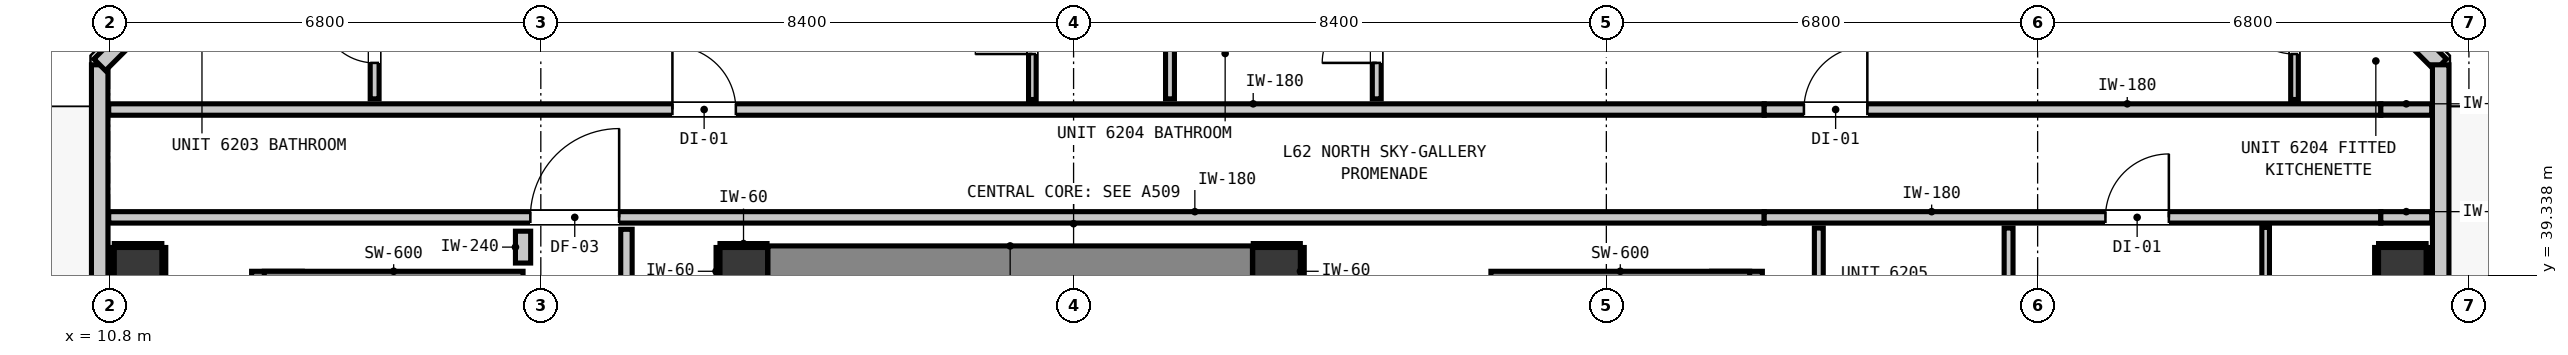
"""IFC4 building model, lengths in metres.
Left out: names, types, materials, properties, quantities, classifications, styles, units other than length and angle.
Written with IfcOpenShell. Run it as: python <this file> out.ifc"""

import sys

from ifc_helpers import new_model, si_unit, direction, frame, frame_2d, origin, origin_2d, place, context, subcontext, project, spatial, rectangle, extrude, element, fill, save


model = new_model("IFC4")
c1 = context("Model", 3, precision=1e-05, world=origin(), true_north=direction((0.0, 1.0)))
c2 = subcontext(c1, "Body", "Model", "MODEL_VIEW")
j1 = project(units=[si_unit("LENGTHUNIT", "METRE"), si_unit("PLANEANGLEUNIT", "RADIAN")], contexts=[c1])
p1 = place(None, origin())
s1 = spatial("IfcSite", under=j1, at=p1, CompositionType="ELEMENT")
p2 = place(p1, origin())
s2 = spatial("IfcBuilding", under=s1, at=p2, CompositionType="ELEMENT")
p3 = place(p2, frame((0.0, 0.0, 213.4)))
s3 = spatial("IfcBuildingStorey", under=s2, at=p3, CompositionType="ELEMENT", Elevation=213.4)
for number, where, z_axis, x_axis in (
    (1, (20.8, 39.4, 0.0), (0.0, 0.0, 1.0), (1.0, 0.0, 0.0)),
    (2, (29.2, 39.4, 0.0), (0.0, 0.0, 1.0), (1.0, 0.0, 0.0)),
):
    element("IfcColumn", number, at=place(p3, frame(where, z_axis=z_axis, x_axis=x_axis)), inside=s3, PredefinedType="COLUMN", context=c2, shape_type="SweptSolid", body=[
        extrude(rectangle(XDim=0.75, YDim=0.75, at=origin_2d()), origin(), (0.0, 0.0, 1.0), 3.32),
    ])
p4 = place(p3, frame((13.44, 31.08, 0.0), z_axis=(0.0, 0.0, 1.0), x_axis=(0.0, 1.0, 0.0)))
e3 = element("IfcWall", 3, at=p4, inside=s3, PredefinedType="SHEAR", context=c2, shape_type="SweptSolid", body=[
    extrude(rectangle(XDim=8.32, YDim=0.8, at=frame_2d((4.16, 0.0))), origin(), (0.0, 0.0, 1.0), 3.32),
])
p5 = place(p3, frame((13.24, 39.1, 0.0), z_axis=(0.0, 0.0, 1.0), x_axis=(1.0, 0.0, 0.0)))
e4 = element("IfcWall", 4, at=p5, inside=s3, PredefinedType="SHEAR", context=c2, shape_type="SweptSolid", body=[
    extrude(rectangle(XDim=4.08, YDim=0.6, at=frame_2d((2.04, 0.0))), origin(), (0.0, 0.0, 1.0), 3.32),
])
p6 = place(p3, frame((36.46, 31.08, 0.0), z_axis=(0.0, 0.0, 1.0), x_axis=(0.0, 1.0, 0.0)))
e5 = element("IfcWall", 5, at=p6, inside=s3, PredefinedType="SHEAR", context=c2, shape_type="SweptSolid", body=[
    extrude(rectangle(XDim=8.32, YDim=0.8, at=frame_2d((4.16, 0.0))), origin(), (0.0, 0.0, 1.0), 3.32),
])
p7 = place(p3, frame((32.58, 39.1, 0.0), z_axis=(0.0, 0.0, 1.0), x_axis=(1.0, 0.0, 0.0)))
e6 = element("IfcWall", 6, at=p7, inside=s3, PredefinedType="SHEAR", context=c2, shape_type="SweptSolid", body=[
    extrude(rectangle(XDim=4.08, YDim=0.6, at=frame_2d((2.04, 0.0))), origin(), (0.0, 0.0, 1.0), 3.32),
])
p8 = place(p3, frame((21.18, 39.4, 0.0), z_axis=(0.0, 0.0, 1.0), x_axis=(1.0, 0.0, 0.0)))
e7 = element("IfcWall", 7, at=p8, inside=s3, PredefinedType="SHEAR", context=c2, shape_type="SweptSolid", body=[
    extrude(rectangle(XDim=7.64, YDim=0.8, at=frame_2d((3.82, 0.0))), origin(), (0.0, 0.0, 1.0), 3.32),
])
for number, where, z_axis, x_axis in (
    (8, (11.25, 39.4, 0.0), (0.0, 0.0, 1.0), (1.0, 0.0, 0.0)),
    (9, (46.95, 39.4, 0.0), (0.0, 0.0, 1.0), (1.0, 0.0, 0.0)),
):
    element("IfcColumn", number, at=place(p3, frame(where, z_axis=z_axis, x_axis=x_axis)), inside=s3, PredefinedType="COLUMN", context=c2, shape_type="SweptSolid", body=[
        extrude(rectangle(XDim=0.75, YDim=0.75, at=origin_2d()), origin(), (0.0, 0.0, 1.0), 3.32),
    ])
p9 = place(p3, frame((10.645, 12.345, 0.0), z_axis=(0.0, 0.0, 1.0), x_axis=(0.0, 1.0, 0.0)))
e10 = element("IfcWall", 10, at=p9, inside=s3, PredefinedType="STANDARD", context=c2, shape_type="SweptSolid", body=[
    extrude(rectangle(XDim=30.31, YDim=0.26, at=frame_2d((15.155, 0.0))), origin(), (0.0, 0.0, 1.0), 3.1),
])
p10 = place(p9, frame((0.91, 0.0, 0.0)))
e11 = element("IfcOpeningElement", 11, at=p10, cuts=e10, PredefinedType="OPENING", context=c2, shape_type="SweptSolid", body=[
    extrude(rectangle(XDim=1.0, YDim=2.15, at=frame_2d((0.5, 1.075))), frame((0.0, 0.14, 0.0), z_axis=(0.0, -1.0, 0.0), x_axis=(1.0, 0.0, 0.0)), (0.0, 0.0, 1.0), 0.28),
])
p11 = place(p9, frame((2.322, 0.0, 0.85)))
e12 = element("IfcOpeningElement", 12, at=p11, cuts=e10, PredefinedType="OPENING", context=c2, shape_type="SweptSolid", body=[
    extrude(rectangle(XDim=0.58, YDim=1.5, at=frame_2d((0.29, 0.75))), frame((0.0, 0.14, 0.0), z_axis=(0.0, -1.0, 0.0), x_axis=(1.0, 0.0, 0.0)), (0.0, 0.0, 1.0), 0.28),
])
for number, where, z_axis, x_axis in (
    (13, (10.645, 42.655, 0.0), (0.0, 0.0, 1.0), (0.707, 0.707, 0.0)),
    (14, (45.455, 44.755, 0.0), (0.0, 0.0, 1.0), (0.707, -0.707, 0.0)),
):
    element("IfcWall", number, at=place(p3, frame(where, z_axis=z_axis, x_axis=x_axis)), inside=s3, PredefinedType="STANDARD", context=c2, shape_type="SweptSolid", body=[
        extrude(rectangle(XDim=2.97, YDim=0.26, at=frame_2d((1.485, 0.0))), origin(), (0.0, 0.0, 1.0), 3.1),
    ])
p12 = place(p3, frame((47.555, 42.655, 0.0), z_axis=(0.0, 0.0, 1.0), x_axis=(0.0, -1.0, 0.0)))
e15 = element("IfcWall", 15, at=p12, inside=s3, PredefinedType="STANDARD", context=c2, shape_type="SweptSolid", body=[
    extrude(rectangle(XDim=30.31, YDim=0.26, at=frame_2d((15.155, 0.0))), origin(), (0.0, 0.0, 1.0), 3.1),
])
p13 = place(p12, frame((4.082, 0.0, 0.0)))
e16 = element("IfcOpeningElement", 16, at=p13, cuts=e15, PredefinedType="OPENING", context=c2, shape_type="SweptSolid", body=[
    extrude(rectangle(XDim=1.0, YDim=2.15, at=frame_2d((0.5, 1.075))), frame((0.0, 0.14, 0.0), z_axis=(0.0, -1.0, 0.0), x_axis=(1.0, 0.0, 0.0)), (0.0, 0.0, 1.0), 0.28),
])
p14 = place(p12, frame((24.101, 0.0, 0.85)))
e17 = element("IfcOpeningElement", 17, at=p14, cuts=e15, PredefinedType="OPENING", context=c2, shape_type="SweptSolid", body=[
    extrude(rectangle(XDim=2.1, YDim=1.9, at=frame_2d((1.05, 0.95))), frame((0.0, 0.14, 0.0), z_axis=(0.0, -1.0, 0.0), x_axis=(1.0, 0.0, 0.0)), (0.0, 0.0, 1.0), 0.28),
])
p15 = place(p12, frame((27.658, 0.0, 0.85)))
e18 = element("IfcOpeningElement", 18, at=p15, cuts=e15, PredefinedType="OPENING", context=c2, shape_type="SweptSolid", body=[
    extrude(rectangle(XDim=2.1, YDim=1.9, at=frame_2d((1.05, 0.95))), frame((0.0, 0.14, 0.0), z_axis=(0.0, -1.0, 0.0), x_axis=(1.0, 0.0, 0.0)), (0.0, 0.0, 1.0), 0.28),
])
p16 = place(p12, frame((15.255, 0.0, 0.85)))
e19 = element("IfcOpeningElement", 19, at=p16, cuts=e15, PredefinedType="OPENING", context=c2, shape_type="SweptSolid", body=[
    extrude(rectangle(XDim=2.1, YDim=1.9, at=frame_2d((1.05, 0.95))), frame((0.0, 0.14, 0.0), z_axis=(0.0, -1.0, 0.0), x_axis=(1.0, 0.0, 0.0)), (0.0, 0.0, 1.0), 0.28),
])
p17 = place(p3, frame((10.787, 40.25, 0.0), z_axis=(0.0, 0.0, 1.0), x_axis=(1.0, 0.0, 0.0)))
e20 = element("IfcWall", 20, at=p17, inside=s3, PredefinedType="PARTITIONING", context=c2, shape_type="SweptSolid", body=[
    extrude(rectangle(XDim=26.102, YDim=0.18, at=frame_2d((13.051, 0.0))), origin(), (0.0, 0.0, 1.0), 3.1),
])
p18 = place(p17, frame((6.648, 0.0, 0.0)))
e21 = element("IfcOpeningElement", 21, at=p18, cuts=e20, PredefinedType="OPENING", context=c2, shape_type="SweptSolid", body=[
    extrude(rectangle(XDim=1.4, YDim=2.15, at=frame_2d((0.7, 1.075))), frame((0.0, 0.1, 0.0), z_axis=(0.0, -1.0, 0.0), x_axis=(1.0, 0.0, 0.0)), (0.0, 0.0, 1.0), 0.2),
])
p19 = place(p3, frame((36.889, 40.25, 0.0), z_axis=(0.0, 0.0, 1.0), x_axis=(1.0, 0.0, 0.0)))
e22 = element("IfcWall", 22, at=p19, inside=s3, PredefinedType="PARTITIONING", context=c2, shape_type="SweptSolid", body=[
    extrude(rectangle(XDim=9.722, YDim=0.18, at=frame_2d((4.861, 0.0))), origin(), (0.0, 0.0, 1.0), 2.477),
])
p20 = place(p19, frame((5.38, 0.0, 0.0)))
e23 = element("IfcOpeningElement", 23, at=p20, cuts=e22, PredefinedType="OPENING", context=c2, shape_type="SweptSolid", body=[
    extrude(rectangle(XDim=1.0, YDim=2.15, at=frame_2d((0.5, 1.075))), frame((0.0, 0.1, 0.0), z_axis=(0.0, -1.0, 0.0), x_axis=(1.0, 0.0, 0.0)), (0.0, 0.0, 1.0), 0.2),
])
p21 = place(p3, frame((46.611, 40.25, 0.0), z_axis=(0.0, 0.0, 1.0), x_axis=(1.0, 0.0, 0.0)))
e24 = element("IfcWall", 24, at=p21, inside=s3, PredefinedType="PARTITIONING", context=c2, shape_type="SweptSolid", body=[
    extrude(rectangle(XDim=0.802, YDim=0.18, at=frame_2d((0.401, 0.0))), origin(), (0.0, 0.0, 1.0), 3.1),
])
p22 = place(p3, frame((10.787, 41.95, 0.0), z_axis=(0.0, 0.0, 1.0), x_axis=(1.0, 0.0, 0.0)))
e25 = element("IfcWall", 25, at=p22, inside=s3, PredefinedType="PARTITIONING", context=c2, shape_type="SweptSolid", body=[
    extrude(rectangle(XDim=26.102, YDim=0.18, at=frame_2d((13.051, 0.0))), origin(), (0.0, 0.0, 1.0), 3.1),
])
p23 = place(p22, frame((8.888, 0.0, 0.0)))
e26 = element("IfcOpeningElement", 26, at=p23, cuts=e25, PredefinedType="OPENING", context=c2, shape_type="SweptSolid", body=[
    extrude(rectangle(XDim=1.0, YDim=2.15, at=frame_2d((0.5, 1.075))), frame((0.0, 0.1, 0.0), z_axis=(0.0, -1.0, 0.0), x_axis=(1.0, 0.0, 0.0)), (0.0, 0.0, 1.0), 0.2),
])
p24 = place(p3, frame((36.889, 41.95, 0.0), z_axis=(0.0, 0.0, 1.0), x_axis=(1.0, 0.0, 0.0)))
e27 = element("IfcWall", 27, at=p24, inside=s3, PredefinedType="PARTITIONING", context=c2, shape_type="SweptSolid", body=[
    extrude(rectangle(XDim=9.722, YDim=0.18, at=frame_2d((4.861, 0.0))), origin(), (0.0, 0.0, 1.0), 2.477),
])
p25 = place(p24, frame((0.626, 0.0, 0.0)))
e28 = element("IfcOpeningElement", 28, at=p25, cuts=e27, PredefinedType="OPENING", context=c2, shape_type="SweptSolid", body=[
    extrude(rectangle(XDim=1.0, YDim=2.15, at=frame_2d((0.5, 1.075))), frame((0.0, 0.1, 0.0), z_axis=(0.0, -1.0, 0.0), x_axis=(1.0, 0.0, 0.0)), (0.0, 0.0, 1.0), 0.2),
])
p26 = place(p3, frame((46.611, 41.95, 0.0), z_axis=(0.0, 0.0, 1.0), x_axis=(1.0, 0.0, 0.0)))
e29 = element("IfcWall", 29, at=p26, inside=s3, PredefinedType="PARTITIONING", context=c2, shape_type="SweptSolid", body=[
    extrude(rectangle(XDim=0.802, YDim=0.18, at=frame_2d((0.401, 0.0))), origin(), (0.0, 0.0, 1.0), 3.1),
])
p27 = place(p3, frame((17.32, 39.53, 0.0), z_axis=(0.0, 0.0, 1.0), x_axis=(0.0, 1.0, 0.0)))
e30 = element("IfcWall", 30, at=p27, inside=s3, PredefinedType="PARTITIONING", context=c2, shape_type="SweptSolid", body=[
    extrude(rectangle(XDim=0.502, YDim=0.24, at=frame_2d((0.251, 0.0))), origin(), (0.0, 0.0, 1.0), 3.1),
])
p28 = place(p3, frame((18.95, 39.058, 0.0), z_axis=(0.0, 0.0, 1.0), x_axis=(0.0, 1.0, 0.0)))
e31 = element("IfcWall", 31, at=p28, inside=s3, PredefinedType="PARTITIONING", context=c2, shape_type="SweptSolid", body=[
    extrude(rectangle(XDim=1.004, YDim=0.18, at=frame_2d((0.502, 0.0))), origin(), (0.0, 0.0, 1.0), 3.1),
])
p29 = place(p3, frame((14.98, 42.118, 0.0), z_axis=(0.0, 0.0, 1.0), x_axis=(0.0, 1.0, 0.0)))
e32 = element("IfcWall", 32, at=p29, inside=s3, PredefinedType="PARTITIONING", context=c2, shape_type="SweptSolid", body=[
    extrude(rectangle(XDim=2.495, YDim=0.14, at=frame_2d((1.248, 0.0))), origin(), (0.0, 0.0, 1.0), 3.1),
])
p30 = place(p29, frame((0.567, 0.0, 0.0)))
e33 = element("IfcOpeningElement", 33, at=p30, cuts=e32, PredefinedType="OPENING", context=c2, shape_type="SweptSolid", body=[
    extrude(rectangle(XDim=0.86, YDim=2.02, at=frame_2d((0.43, 1.01))), frame((0.0, 0.08, 0.0), z_axis=(0.0, -1.0, 0.0), x_axis=(1.0, 0.0, 0.0)), (0.0, 0.0, 1.0), 0.16),
])
p31 = place(p3, frame((27.52, 42.118, 0.0), z_axis=(0.0, 0.0, 1.0), x_axis=(0.0, 1.0, 0.0)))
e34 = element("IfcWall", 34, at=p31, inside=s3, PredefinedType="PARTITIONING", context=c2, shape_type="SweptSolid", body=[
    extrude(rectangle(XDim=2.495, YDim=0.14, at=frame_2d((1.248, 0.0))), origin(), (0.0, 0.0, 1.0), 3.1),
])
p32 = place(p3, frame((30.78, 42.118, 0.0), z_axis=(0.0, 0.0, 1.0), x_axis=(0.0, 1.0, 0.0)))
e35 = element("IfcWall", 35, at=p32, inside=s3, PredefinedType="PARTITIONING", context=c2, shape_type="SweptSolid", body=[
    extrude(rectangle(XDim=2.495, YDim=0.14, at=frame_2d((1.248, 0.0))), origin(), (0.0, 0.0, 1.0), 3.1),
])
p33 = place(p32, frame((0.567, 0.0, 0.0)))
e36 = element("IfcOpeningElement", 36, at=p33, cuts=e35, PredefinedType="OPENING", context=c2, shape_type="SweptSolid", body=[
    extrude(rectangle(XDim=0.86, YDim=2.02, at=frame_2d((0.43, 1.01))), frame((0.0, 0.08, 0.0), z_axis=(0.0, -1.0, 0.0), x_axis=(1.0, 0.0, 0.0)), (0.0, 0.0, 1.0), 0.16),
])
p34 = place(p3, frame((37.75, 36.679, 0.0), z_axis=(0.0, 0.0, 1.0), x_axis=(0.0, 1.0, 0.0)))
e37 = element("IfcWall", 37, at=p34, inside=s3, PredefinedType="PARTITIONING", context=c2, shape_type="SweptSolid", body=[
    extrude(rectangle(XDim=3.403, YDim=0.14, at=frame_2d((1.702, 0.0))), origin(), (0.0, 0.0, 1.0), 3.1),
])
p35 = place(p3, frame((40.742, 36.679, 0.0), z_axis=(0.0, 0.0, 1.0), x_axis=(0.0, 1.0, 0.0)))
e38 = element("IfcWall", 38, at=p35, inside=s3, PredefinedType="PARTITIONING", context=c2, shape_type="SweptSolid", body=[
    extrude(rectangle(XDim=3.403, YDim=0.14, at=frame_2d((1.702, 0.0))), origin(), (0.0, 0.0, 1.0), 3.1),
])
p36 = place(p35, frame((1.269, 0.0, 0.0)))
e39 = element("IfcOpeningElement", 39, at=p36, cuts=e38, PredefinedType="OPENING", context=c2, shape_type="SweptSolid", body=[
    extrude(rectangle(XDim=0.86, YDim=2.02, at=frame_2d((0.43, 1.01))), frame((0.0, 0.08, 0.0), z_axis=(0.0, -1.0, 0.0), x_axis=(1.0, 0.0, 0.0)), (0.0, 0.0, 1.0), 0.16),
])
p37 = place(p3, frame((25.35, 42.108, 0.0), z_axis=(0.0, 0.0, 1.0), x_axis=(0.0, 1.0, 0.0)))
e40 = element("IfcWall", 40, at=p37, inside=s3, PredefinedType="PARTITIONING", context=c2, shape_type="SweptSolid", body=[
    extrude(rectangle(XDim=2.505, YDim=0.12, at=frame_2d((1.252, 0.0))), origin(), (0.0, 0.0, 1.0), 3.1),
])
p38 = place(p37, frame((0.717, 0.0, 0.0)))
e41 = element("IfcOpeningElement", 41, at=p38, cuts=e40, PredefinedType="OPENING", context=c2, shape_type="SweptSolid", body=[
    extrude(rectangle(XDim=0.9, YDim=2.1, at=frame_2d((0.45, 1.05))), frame((0.0, 0.07, 0.0), z_axis=(0.0, -1.0, 0.0), x_axis=(1.0, 0.0, 0.0)), (0.0, 0.0, 1.0), 0.14),
])
p39 = place(p3, frame((44.795, 31.808, 0.0), z_axis=(0.0, 0.0, 1.0), x_axis=(0.0, 1.0, 0.0)))
e42 = element("IfcWall", 42, at=p39, inside=s3, PredefinedType="PARTITIONING", context=c2, shape_type="SweptSolid", body=[
    extrude(rectangle(XDim=8.284, YDim=0.12, at=frame_2d((4.142, 0.0))), origin(), (0.0, 0.0, 1.0), 3.1),
])
p40 = place(p39, frame((3.667, 0.0, 0.0)))
e43 = element("IfcOpeningElement", 43, at=p40, cuts=e42, PredefinedType="OPENING", context=c2, shape_type="SweptSolid", body=[
    extrude(rectangle(XDim=0.9, YDim=2.1, at=frame_2d((0.45, 1.05))), frame((0.0, 0.07, 0.0), z_axis=(0.0, -1.0, 0.0), x_axis=(1.0, 0.0, 0.0)), (0.0, 0.0, 1.0), 0.14),
])
p41 = place(p3, frame((45.25, 42.108, 0.0), z_axis=(0.0, 0.0, 1.0), x_axis=(0.0, 1.0, 0.0)))
e44 = element("IfcWall", 44, at=p41, inside=s3, PredefinedType="PARTITIONING", context=c2, shape_type="SweptSolid", body=[
    extrude(rectangle(XDim=2.505, YDim=0.12, at=frame_2d((1.252, 0.0))), origin(), (0.0, 0.0, 1.0), 3.1),
])
p42 = place(p41, frame((0.717, 0.0, 0.0)))
e45 = element("IfcOpeningElement", 45, at=p42, cuts=e44, PredefinedType="OPENING", context=c2, shape_type="SweptSolid", body=[
    extrude(rectangle(XDim=0.9, YDim=2.1, at=frame_2d((0.45, 1.05))), frame((0.0, 0.07, 0.0), z_axis=(0.0, -1.0, 0.0), x_axis=(1.0, 0.0, 0.0)), (0.0, 0.0, 1.0), 0.14),
])
p43 = place(p3, frame((20.425, 39.807, 0.0), z_axis=(0.0, 0.0, 1.0), x_axis=(1.0, 0.0, 0.0)))
e46 = element("IfcWall", 46, at=p43, inside=s3, PredefinedType="PARTITIONING", context=c2, shape_type="SweptSolid", body=[
    extrude(rectangle(XDim=0.742, YDim=0.06, at=frame_2d((0.371, 0.0))), origin(), (0.0, 0.0, 1.0), 1.45),
])
p44 = place(p3, frame((20.393, 39.025, 0.0), z_axis=(0.0, 0.0, 1.0), x_axis=(0.0, 1.0, 0.0)))
e47 = element("IfcWall", 47, at=p44, inside=s3, PredefinedType="PARTITIONING", context=c2, shape_type="SweptSolid", body=[
    extrude(rectangle(XDim=0.75, YDim=0.06, at=frame_2d((0.375, 0.0))), origin(), (0.0, 0.0, 1.0), 1.45),
])
p45 = place(p3, frame((28.833, 39.807, 0.0), z_axis=(0.0, 0.0, 1.0), x_axis=(1.0, 0.0, 0.0)))
e48 = element("IfcWall", 48, at=p45, inside=s3, PredefinedType="PARTITIONING", context=c2, shape_type="SweptSolid", body=[
    extrude(rectangle(XDim=0.742, YDim=0.06, at=frame_2d((0.371, 0.0))), origin(), (0.0, 0.0, 1.0), 1.45),
])
for number, where, z_axis, x_axis in (
    (49, (29.607, 39.025, 0.0), (0.0, 0.0, 1.0), (0.0, 1.0, 0.0)),
    (50, (10.875, 39.807, 0.0), (0.0, 0.0, 1.0), (1.0, 0.0, 0.0)),
    (51, (10.843, 39.025, 0.0), (0.0, 0.0, 1.0), (0.0, 1.0, 0.0)),
    (52, (11.657, 39.025, 0.0), (0.0, 0.0, 1.0), (0.0, 1.0, 0.0)),
    (53, (46.575, 39.807, 0.0), (0.0, 0.0, 1.0), (1.0, 0.0, 0.0)),
    (54, (46.543, 39.025, 0.0), (0.0, 0.0, 1.0), (0.0, 1.0, 0.0)),
    (55, (47.357, 39.025, 0.0), (0.0, 0.0, 1.0), (0.0, 1.0, 0.0)),
):
    element("IfcWall", number, at=place(p3, frame(where, z_axis=z_axis, x_axis=x_axis)), inside=s3, PredefinedType="PARTITIONING", context=c2, shape_type="SweptSolid", body=[
        extrude(rectangle(XDim=0.75, YDim=0.06, at=frame_2d((0.375, 0.0))), origin(), (0.0, 0.0, 1.0), 1.45),
    ])
p46 = place(p18, origin())
e56 = element("IfcDoor", 56, at=p46, inside=s3, OperationType="SINGLE_SWING_RIGHT", PredefinedType="DOOR", context=c2, shape_type="SweptSolid", body=[
    extrude(rectangle(XDim=1.4, YDim=2.15, at=frame_2d((0.7, 1.075))), frame((0.0, 0.025, 0.0), z_axis=(0.0, -1.0, 0.0), x_axis=(1.0, 0.0, 0.0)), (0.0, 0.0, 1.0), 0.05),
])
fill(e21, e56)
p47 = place(p23, origin())
e57 = element("IfcDoor", 57, at=p47, inside=s3, OperationType="SINGLE_SWING_LEFT", PredefinedType="DOOR", context=c2, shape_type="SweptSolid", body=[
    extrude(rectangle(XDim=1.0, YDim=2.15, at=frame_2d((0.5, 1.075))), frame((0.0, 0.025, 0.0), z_axis=(0.0, -1.0, 0.0), x_axis=(1.0, 0.0, 0.0)), (0.0, 0.0, 1.0), 0.05),
])
fill(e26, e57)
p48 = place(p30, origin())
e58 = element("IfcDoor", 58, at=p48, inside=s3, OperationType="SINGLE_SWING_RIGHT", PredefinedType="DOOR", context=c2, shape_type="SweptSolid", body=[
    extrude(rectangle(XDim=0.86, YDim=2.02, at=frame_2d((0.43, 1.01))), frame((0.0, 0.025, 0.0), z_axis=(0.0, -1.0, 0.0), x_axis=(1.0, 0.0, 0.0)), (0.0, 0.0, 1.0), 0.05),
])
fill(e33, e58)
p49 = place(p38, origin())
e59 = element("IfcDoor", 59, at=p49, inside=s3, OperationType="SINGLE_SWING_LEFT", PredefinedType="DOOR", context=c2, shape_type="SweptSolid", body=[
    extrude(rectangle(XDim=0.9, YDim=2.1, at=frame_2d((0.45, 1.05))), frame((0.0, 0.025, 0.0), z_axis=(0.0, -1.0, 0.0), x_axis=(1.0, 0.0, 0.0)), (0.0, 0.0, 1.0), 0.05),
])
fill(e41, e59)
p50 = place(p25, origin())
e60 = element("IfcDoor", 60, at=p50, inside=s3, OperationType="SINGLE_SWING_RIGHT", PredefinedType="DOOR", context=c2, shape_type="SweptSolid", body=[
    extrude(rectangle(XDim=1.0, YDim=2.15, at=frame_2d((0.5, 1.075))), frame((0.0, 0.025, 0.0), z_axis=(0.0, -1.0, 0.0), x_axis=(1.0, 0.0, 0.0)), (0.0, 0.0, 1.0), 0.05),
])
fill(e28, e60)
p51 = place(p33, origin())
e61 = element("IfcDoor", 61, at=p51, inside=s3, OperationType="SINGLE_SWING_LEFT", PredefinedType="DOOR", context=c2, shape_type="SweptSolid", body=[
    extrude(rectangle(XDim=0.86, YDim=2.02, at=frame_2d((0.43, 1.01))), frame((0.0, 0.025, 0.0), z_axis=(0.0, -1.0, 0.0), x_axis=(1.0, 0.0, 0.0)), (0.0, 0.0, 1.0), 0.05),
])
fill(e36, e61)
p52 = place(p42, origin())
e62 = element("IfcDoor", 62, at=p52, inside=s3, OperationType="SINGLE_SWING_RIGHT", PredefinedType="DOOR", context=c2, shape_type="SweptSolid", body=[
    extrude(rectangle(XDim=0.9, YDim=2.1, at=frame_2d((0.45, 1.05))), frame((0.0, 0.025, 0.0), z_axis=(0.0, -1.0, 0.0), x_axis=(1.0, 0.0, 0.0)), (0.0, 0.0, 1.0), 0.05),
])
fill(e45, e62)
p53 = place(p20, origin())
e63 = element("IfcDoor", 63, at=p53, inside=s3, OperationType="SINGLE_SWING_RIGHT", PredefinedType="DOOR", context=c2, shape_type="SweptSolid", body=[
    extrude(rectangle(XDim=1.0, YDim=2.15, at=frame_2d((0.5, 1.075))), frame((0.0, 0.025, 0.0), z_axis=(0.0, -1.0, 0.0), x_axis=(1.0, 0.0, 0.0)), (0.0, 0.0, 1.0), 0.05),
])
fill(e23, e63)
save(model, sys.argv[1])
